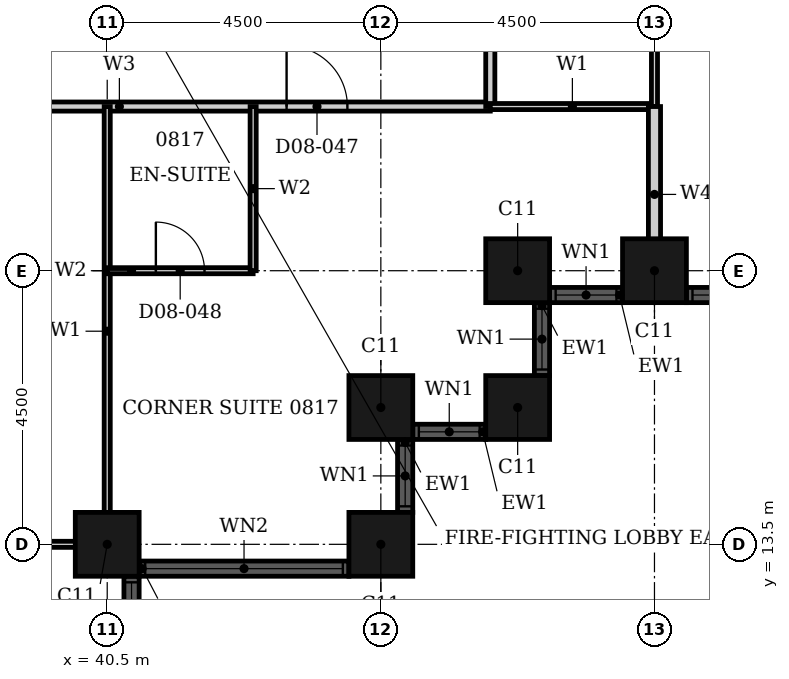
"""IFC4 building model, lengths in metres.
Left out: names, types, materials, properties, quantities, classifications, styles, units other than length and angle.
Written with IfcOpenShell. Run it as: python <this file> out.ifc"""

import sys

from ifc_helpers import new_model, si_unit, direction, frame, frame_2d, origin, origin_2d, place, context, subcontext, project, spatial, rectangle, hollow_rectangle, extrude, element, fill, save


model = new_model("IFC4")
c1 = context("Model", 3, precision=1e-05, world=origin(), true_north=direction((0.0, 1.0)))
c2 = subcontext(c1, "Body", "Model", "MODEL_VIEW")
j1 = project(units=[si_unit("LENGTHUNIT", "METRE"), si_unit("PLANEANGLEUNIT", "RADIAN")], contexts=[c1])
p1 = place(None, origin())
s1 = spatial("IfcSite", under=j1, at=p1, CompositionType="ELEMENT")
p2 = place(p1, origin())
s2 = spatial("IfcBuilding", under=s1, at=p2, CompositionType="ELEMENT")
p3 = place(p2, frame((0.0, 0.0, 40.8)))
s3 = spatial("IfcBuildingStorey", under=s2, at=p3, CompositionType="ELEMENT", Elevation=40.8)
for number, where, z_axis, x_axis in (
    (1, (40.5, 13.5, 0.0), (0.0, 0.0, 1.0), (1.0, 0.0, 0.0)),
    (2, (45.0, 13.5, 0.0), (0.0, 0.0, 1.0), (1.0, 0.0, 0.0)),
    (3, (45.0, 15.75, 0.0), (0.0, 0.0, 1.0), (1.0, 0.0, 0.0)),
    (4, (47.25, 15.75, 0.0), (0.0, 0.0, 1.0), (1.0, 0.0, 0.0)),
    (5, (47.25, 18.0, 0.0), (0.0, 0.0, 1.0), (1.0, 0.0, 0.0)),
    (6, (49.5, 18.0, 0.0), (0.0, 0.0, 1.0), (1.0, 0.0, 0.0)),
):
    element("IfcColumn", number, at=place(p3, frame(where, z_axis=z_axis, x_axis=x_axis)), inside=s3, PredefinedType="COLUMN", context=c2, shape_type="SweptSolid", body=[
        extrude(hollow_rectangle(XDim=1.05, YDim=1.05, WallThickness=0.034, at=origin_2d()), origin(), (0.0, 0.0, 1.0), 3.6),
    ])
p4 = place(p3, frame((40.9, 5.025, 0.0), z_axis=(0.0, 0.0, 1.0), x_axis=(0.0, 1.0, 0.0)))
e7 = element("IfcWall", 7, at=p4, inside=s3, PredefinedType="SOLIDWALL", context=c2, shape_type="SweptSolid", body=[
    extrude(rectangle(XDim=7.95, YDim=0.25, at=frame_2d((3.975, 0.0))), origin(), (0.0, 0.0, 1.0), 3.6),
])
p5 = place(p4, frame((0.1, 0.0, 0.9)))
e8 = element("IfcOpeningElement", 8, at=p5, cuts=e7, PredefinedType="OPENING", context=c2, shape_type="SweptSolid", body=[
    extrude(rectangle(XDim=3.25, YDim=2.08, at=frame_2d((1.625, 1.04))), frame((0.0, 0.135, 0.0), z_axis=(0.0, -1.0, 0.0), x_axis=(1.0, 0.0, 0.0)), (0.0, 0.0, 1.0), 0.27),
])
p6 = place(p4, frame((4.6, 0.0, 0.9)))
e9 = element("IfcOpeningElement", 9, at=p6, cuts=e7, PredefinedType="OPENING", context=c2, shape_type="SweptSolid", body=[
    extrude(rectangle(XDim=3.25, YDim=2.08, at=frame_2d((1.625, 1.04))), frame((0.0, 0.135, 0.0), z_axis=(0.0, -1.0, 0.0), x_axis=(1.0, 0.0, 0.0)), (0.0, 0.0, 1.0), 0.27),
])
p7 = place(p3, frame((41.025, 13.1, 0.0), z_axis=(0.0, 0.0, 1.0), x_axis=(1.0, 0.0, 0.0)))
e10 = element("IfcWall", 10, at=p7, inside=s3, PredefinedType="SOLIDWALL", context=c2, shape_type="SweptSolid", body=[
    extrude(rectangle(XDim=3.45, YDim=0.25, at=frame_2d((1.725, 0.0))), origin(), (0.0, 0.0, 1.0), 3.6),
])
p8 = place(p7, frame((0.1, 0.0, 0.9)))
e11 = element("IfcOpeningElement", 11, at=p8, cuts=e10, PredefinedType="OPENING", context=c2, shape_type="SweptSolid", body=[
    extrude(rectangle(XDim=3.25, YDim=2.08, at=frame_2d((1.625, 1.04))), frame((0.0, 0.135, 0.0), z_axis=(0.0, -1.0, 0.0), x_axis=(1.0, 0.0, 0.0)), (0.0, 0.0, 1.0), 0.27),
])
p9 = place(p3, frame((45.4, 14.025, 0.0), z_axis=(0.0, 0.0, 1.0), x_axis=(0.0, 1.0, 0.0)))
e12 = element("IfcWall", 12, at=p9, inside=s3, PredefinedType="SOLIDWALL", context=c2, shape_type="SweptSolid", body=[
    extrude(rectangle(XDim=1.2, YDim=0.25, at=frame_2d((0.6, 0.0))), origin(), (0.0, 0.0, 1.0), 3.6),
])
p10 = place(p9, frame((0.1, 0.0, 0.9)))
e13 = element("IfcOpeningElement", 13, at=p10, cuts=e12, PredefinedType="OPENING", context=c2, shape_type="SweptSolid", body=[
    extrude(rectangle(XDim=1.0, YDim=2.08, at=frame_2d((0.5, 1.04))), frame((0.0, 0.135, 0.0), z_axis=(0.0, -1.0, 0.0), x_axis=(1.0, 0.0, 0.0)), (0.0, 0.0, 1.0), 0.27),
])
p11 = place(p3, frame((45.525, 15.35, 0.0), z_axis=(0.0, 0.0, 1.0), x_axis=(1.0, 0.0, 0.0)))
e14 = element("IfcWall", 14, at=p11, inside=s3, PredefinedType="SOLIDWALL", context=c2, shape_type="SweptSolid", body=[
    extrude(rectangle(XDim=1.2, YDim=0.25, at=frame_2d((0.6, 0.0))), origin(), (0.0, 0.0, 1.0), 3.6),
])
p12 = place(p11, frame((0.1, 0.0, 0.9)))
e15 = element("IfcOpeningElement", 15, at=p12, cuts=e14, PredefinedType="OPENING", context=c2, shape_type="SweptSolid", body=[
    extrude(rectangle(XDim=1.0, YDim=2.08, at=frame_2d((0.5, 1.04))), frame((0.0, 0.135, 0.0), z_axis=(0.0, -1.0, 0.0), x_axis=(1.0, 0.0, 0.0)), (0.0, 0.0, 1.0), 0.27),
])
p13 = place(p3, frame((47.65, 16.275, 0.0), z_axis=(0.0, 0.0, 1.0), x_axis=(0.0, 1.0, 0.0)))
e16 = element("IfcWall", 16, at=p13, inside=s3, PredefinedType="SOLIDWALL", context=c2, shape_type="SweptSolid", body=[
    extrude(rectangle(XDim=1.2, YDim=0.25, at=frame_2d((0.6, 0.0))), origin(), (0.0, 0.0, 1.0), 3.6),
])
p14 = place(p13, frame((0.1, 0.0, 0.9)))
e17 = element("IfcOpeningElement", 17, at=p14, cuts=e16, PredefinedType="OPENING", context=c2, shape_type="SweptSolid", body=[
    extrude(rectangle(XDim=1.0, YDim=2.08, at=frame_2d((0.5, 1.04))), frame((0.0, 0.135, 0.0), z_axis=(0.0, -1.0, 0.0), x_axis=(1.0, 0.0, 0.0)), (0.0, 0.0, 1.0), 0.27),
])
p15 = place(p3, frame((47.775, 17.6, 0.0), z_axis=(0.0, 0.0, 1.0), x_axis=(1.0, 0.0, 0.0)))
e18 = element("IfcWall", 18, at=p15, inside=s3, PredefinedType="SOLIDWALL", context=c2, shape_type="SweptSolid", body=[
    extrude(rectangle(XDim=1.2, YDim=0.25, at=frame_2d((0.6, 0.0))), origin(), (0.0, 0.0, 1.0), 3.6),
])
p16 = place(p15, frame((0.1, 0.0, 0.9)))
e19 = element("IfcOpeningElement", 19, at=p16, cuts=e18, PredefinedType="OPENING", context=c2, shape_type="SweptSolid", body=[
    extrude(rectangle(XDim=1.0, YDim=2.08, at=frame_2d((0.5, 1.04))), frame((0.0, 0.135, 0.0), z_axis=(0.0, -1.0, 0.0), x_axis=(1.0, 0.0, 0.0)), (0.0, 0.0, 1.0), 0.27),
])
p17 = place(p3, frame((50.025, 17.6, 0.0), z_axis=(0.0, 0.0, 1.0), x_axis=(1.0, 0.0, 0.0)))
e20 = element("IfcWall", 20, at=p17, inside=s3, PredefinedType="SOLIDWALL", context=c2, shape_type="SweptSolid", body=[
    extrude(rectangle(XDim=7.95, YDim=0.25, at=frame_2d((3.975, 0.0))), origin(), (0.0, 0.0, 1.0), 3.6),
])
p18 = place(p17, frame((0.1, 0.0, 0.9)))
e21 = element("IfcOpeningElement", 21, at=p18, cuts=e20, PredefinedType="OPENING", context=c2, shape_type="SweptSolid", body=[
    extrude(rectangle(XDim=3.25, YDim=2.08, at=frame_2d((1.625, 1.04))), frame((0.0, 0.135, 0.0), z_axis=(0.0, -1.0, 0.0), x_axis=(1.0, 0.0, 0.0)), (0.0, 0.0, 1.0), 0.27),
])
p19 = place(p17, frame((4.6, 0.0, 0.9)))
e22 = element("IfcOpeningElement", 22, at=p19, cuts=e20, PredefinedType="OPENING", context=c2, shape_type="SweptSolid", body=[
    extrude(rectangle(XDim=3.25, YDim=2.08, at=frame_2d((1.625, 1.04))), frame((0.0, 0.135, 0.0), z_axis=(0.0, -1.0, 0.0), x_axis=(1.0, 0.0, 0.0)), (0.0, 0.0, 1.0), 0.27),
])
p20 = place(p3, frame((31.5, 20.7, 0.0), z_axis=(0.0, 0.0, 1.0), x_axis=(1.0, 0.0, 0.0)))
e23 = element("IfcWall", 23, at=p20, inside=s3, PredefinedType="PARTITIONING", context=c2, shape_type="SweptSolid", body=[
    extrude(rectangle(XDim=15.3, YDim=0.15, at=frame_2d((7.65, 0.0))), origin(), (0.0, 0.0, 1.0), 3.3),
])
p21 = place(p20, frame((11.95, 0.0, 0.0)))
e24 = element("IfcOpeningElement", 24, at=p21, cuts=e23, PredefinedType="OPENING", context=c2, shape_type="SweptSolid", body=[
    extrude(rectangle(XDim=1.0, YDim=2.1, at=frame_2d((0.5, 1.05))), frame((0.0, 0.085, 0.0), z_axis=(0.0, -1.0, 0.0), x_axis=(1.0, 0.0, 0.0)), (0.0, 0.0, 1.0), 0.17),
])
p22 = place(p20, frame((1.05, 0.0, 0.0)))
e25 = element("IfcOpeningElement", 25, at=p22, cuts=e23, PredefinedType="OPENING", context=c2, shape_type="SweptSolid", body=[
    extrude(rectangle(XDim=0.9, YDim=2.1, at=frame_2d((0.45, 1.05))), frame((0.0, 0.085, 0.0), z_axis=(0.0, -1.0, 0.0), x_axis=(1.0, 0.0, 0.0)), (0.0, 0.0, 1.0), 0.17),
])
p23 = place(p20, frame((5.55, 0.0, 0.0)))
e26 = element("IfcOpeningElement", 26, at=p23, cuts=e23, PredefinedType="OPENING", context=c2, shape_type="SweptSolid", body=[
    extrude(rectangle(XDim=0.9, YDim=2.1, at=frame_2d((0.45, 1.05))), frame((0.0, 0.085, 0.0), z_axis=(0.0, -1.0, 0.0), x_axis=(1.0, 0.0, 0.0)), (0.0, 0.0, 1.0), 0.17),
])
p24 = place(p3, frame((46.8, 20.7, 0.0), z_axis=(0.0, 0.0, 1.0), x_axis=(0.0, 1.0, 0.0)))
e27 = element("IfcWall", 27, at=p24, inside=s3, PredefinedType="PARTITIONING", context=c2, shape_type="SweptSolid", body=[
    extrude(rectangle(XDim=6.3, YDim=0.15, at=frame_2d((3.15, 0.0))), origin(), (0.0, 0.0, 1.0), 3.3),
])
p25 = place(p24, frame((2.65, 0.0, 0.0)))
e28 = element("IfcOpeningElement", 28, at=p25, cuts=e27, PredefinedType="OPENING", context=c2, shape_type="SweptSolid", body=[
    extrude(rectangle(XDim=0.9, YDim=2.1, at=frame_2d((0.45, 1.05))), frame((0.0, 0.085, 0.0), z_axis=(0.0, -1.0, 0.0), x_axis=(1.0, 0.0, 0.0)), (0.0, 0.0, 1.0), 0.17),
])
p26 = place(p3, frame((31.5, 13.5, 0.0), z_axis=(0.0, 0.0, 1.0), x_axis=(1.0, 0.0, 0.0)))
e29 = element("IfcWall", 29, at=p26, inside=s3, PredefinedType="PARTITIONING", context=c2, shape_type="SweptSolid", body=[
    extrude(rectangle(XDim=9.19, YDim=0.1, at=frame_2d((4.595, 0.0))), origin(), (0.0, 0.0, 1.0), 2.38),
])
p27 = place(p3, frame((46.8, 20.7, 0.0), z_axis=(0.0, 0.0, 1.0), x_axis=(1.0, 0.0, 0.0)))
e30 = element("IfcWall", 30, at=p27, inside=s3, PredefinedType="PARTITIONING", context=c2, shape_type="SweptSolid", body=[
    extrude(rectangle(XDim=2.7, YDim=0.1, at=frame_2d((1.35, 0.0))), origin(), (0.0, 0.0, 1.0), 3.3),
])
p28 = place(p3, frame((40.5, 13.31, 0.0), z_axis=(0.0, 0.0, 1.0), x_axis=(0.0, 1.0, 0.0)))
e31 = element("IfcWall", 31, at=p28, inside=s3, PredefinedType="PARTITIONING", context=c2, shape_type="SweptSolid", body=[
    extrude(rectangle(XDim=7.39, YDim=0.1, at=frame_2d((3.695, 0.0))), origin(), (0.0, 0.0, 1.0), 3.3),
])
p29 = place(p3, frame((49.5, 20.7, 0.0), z_axis=(0.0, 0.0, 1.0), x_axis=(0.0, 1.0, 0.0)))
e32 = element("IfcWall", 32, at=p29, inside=s3, PredefinedType="PARTITIONING", context=c2, shape_type="SweptSolid", body=[
    extrude(rectangle(XDim=6.3, YDim=0.1, at=frame_2d((3.15, 0.0))), origin(), (0.0, 0.0, 1.0), 2.38),
])
p30 = place(p3, frame((49.5, 17.81, 0.0), z_axis=(0.0, 0.0, 1.0), x_axis=(0.0, 1.0, 0.0)))
e33 = element("IfcWall", 33, at=p30, inside=s3, PredefinedType="PARTITIONING", context=c2, shape_type="SweptSolid", body=[
    extrude(rectangle(XDim=2.89, YDim=0.2, at=frame_2d((1.445, 0.0))), origin(), (0.0, 0.0, 1.0), 2.38),
])
p31 = place(p3, frame((40.5, 18.0, 0.0), z_axis=(0.0, 0.0, 1.0), x_axis=(1.0, 0.0, 0.0)))
e34 = element("IfcWall", 34, at=p31, inside=s3, PredefinedType="PARTITIONING", context=c2, shape_type="SweptSolid", body=[
    extrude(rectangle(XDim=2.4, YDim=0.1, at=frame_2d((1.2, 0.0))), origin(), (0.0, 0.0, 1.0), 3.3),
])
p32 = place(p31, frame((0.8, 0.0, 0.0)))
e35 = element("IfcOpeningElement", 35, at=p32, cuts=e34, PredefinedType="OPENING", context=c2, shape_type="SweptSolid", body=[
    extrude(rectangle(XDim=0.8, YDim=2.1, at=frame_2d((0.4, 1.05))), frame((0.0, 0.06, 0.0), z_axis=(0.0, -1.0, 0.0), x_axis=(1.0, 0.0, 0.0)), (0.0, 0.0, 1.0), 0.12),
])
p33 = place(p3, frame((42.9, 18.0, 0.0), z_axis=(0.0, 0.0, 1.0), x_axis=(0.0, 1.0, 0.0)))
e36 = element("IfcWall", 36, at=p33, inside=s3, PredefinedType="PARTITIONING", context=c2, shape_type="SweptSolid", body=[
    extrude(rectangle(XDim=2.7, YDim=0.1, at=frame_2d((1.35, 0.0))), origin(), (0.0, 0.0, 1.0), 3.3),
])
p34 = place(p6, origin())
e37 = element("IfcWindow", 37, at=p34, inside=s3, PartitioningType="SINGLE_PANEL", PredefinedType="WINDOW", context=c2, shape_type="SweptSolid", body=[
    extrude(rectangle(XDim=3.25, YDim=2.08, at=frame_2d((1.625, 1.04))), frame((0.0, 0.03, 0.0), z_axis=(0.0, -1.0, 0.0), x_axis=(1.0, 0.0, 0.0)), (0.0, 0.0, 1.0), 0.06),
])
fill(e9, e37)
p35 = place(p8, origin())
e38 = element("IfcWindow", 38, at=p35, inside=s3, PartitioningType="SINGLE_PANEL", PredefinedType="WINDOW", context=c2, shape_type="SweptSolid", body=[
    extrude(rectangle(XDim=3.25, YDim=2.08, at=frame_2d((1.625, 1.04))), frame((0.0, 0.03, 0.0), z_axis=(0.0, -1.0, 0.0), x_axis=(1.0, 0.0, 0.0)), (0.0, 0.0, 1.0), 0.06),
])
fill(e11, e38)
p36 = place(p10, origin())
e39 = element("IfcWindow", 39, at=p36, inside=s3, PartitioningType="SINGLE_PANEL", PredefinedType="WINDOW", context=c2, shape_type="SweptSolid", body=[
    extrude(rectangle(XDim=1.0, YDim=2.08, at=frame_2d((0.5, 1.04))), frame((0.0, 0.03, 0.0), z_axis=(0.0, -1.0, 0.0), x_axis=(1.0, 0.0, 0.0)), (0.0, 0.0, 1.0), 0.06),
])
fill(e13, e39)
p37 = place(p12, origin())
e40 = element("IfcWindow", 40, at=p37, inside=s3, PartitioningType="SINGLE_PANEL", PredefinedType="WINDOW", context=c2, shape_type="SweptSolid", body=[
    extrude(rectangle(XDim=1.0, YDim=2.08, at=frame_2d((0.5, 1.04))), frame((0.0, 0.03, 0.0), z_axis=(0.0, -1.0, 0.0), x_axis=(1.0, 0.0, 0.0)), (0.0, 0.0, 1.0), 0.06),
])
fill(e15, e40)
p38 = place(p14, origin())
e41 = element("IfcWindow", 41, at=p38, inside=s3, PartitioningType="SINGLE_PANEL", PredefinedType="WINDOW", context=c2, shape_type="SweptSolid", body=[
    extrude(rectangle(XDim=1.0, YDim=2.08, at=frame_2d((0.5, 1.04))), frame((0.0, 0.03, 0.0), z_axis=(0.0, -1.0, 0.0), x_axis=(1.0, 0.0, 0.0)), (0.0, 0.0, 1.0), 0.06),
])
fill(e17, e41)
p39 = place(p16, origin())
e42 = element("IfcWindow", 42, at=p39, inside=s3, PartitioningType="SINGLE_PANEL", PredefinedType="WINDOW", context=c2, shape_type="SweptSolid", body=[
    extrude(rectangle(XDim=1.0, YDim=2.08, at=frame_2d((0.5, 1.04))), frame((0.0, 0.03, 0.0), z_axis=(0.0, -1.0, 0.0), x_axis=(1.0, 0.0, 0.0)), (0.0, 0.0, 1.0), 0.06),
])
fill(e19, e42)
p40 = place(p18, origin())
e43 = element("IfcWindow", 43, at=p40, inside=s3, PartitioningType="SINGLE_PANEL", PredefinedType="WINDOW", context=c2, shape_type="SweptSolid", body=[
    extrude(rectangle(XDim=3.25, YDim=2.08, at=frame_2d((1.625, 1.04))), frame((0.0, 0.03, 0.0), z_axis=(0.0, -1.0, 0.0), x_axis=(1.0, 0.0, 0.0)), (0.0, 0.0, 1.0), 0.06),
])
fill(e21, e43)
p41 = place(p21, origin())
e44 = element("IfcDoor", 44, at=p41, inside=s3, OperationType="SINGLE_SWING_RIGHT", PredefinedType="DOOR", context=c2, shape_type="SweptSolid", body=[
    extrude(rectangle(XDim=1.0, YDim=2.1, at=frame_2d((0.5, 1.05))), frame((0.0, 0.025, 0.0), z_axis=(0.0, -1.0, 0.0), x_axis=(1.0, 0.0, 0.0)), (0.0, 0.0, 1.0), 0.05),
])
fill(e24, e44)
p42 = place(p32, origin())
e45 = element("IfcDoor", 45, at=p42, inside=s3, OperationType="SINGLE_SWING_LEFT", PredefinedType="DOOR", context=c2, shape_type="SweptSolid", body=[
    extrude(rectangle(XDim=0.8, YDim=2.1, at=frame_2d((0.4, 1.05))), frame((0.0, 0.025, 0.0), z_axis=(0.0, -1.0, 0.0), x_axis=(1.0, 0.0, 0.0)), (0.0, 0.0, 1.0), 0.05),
])
fill(e35, e45)
save(model, sys.argv[1])
